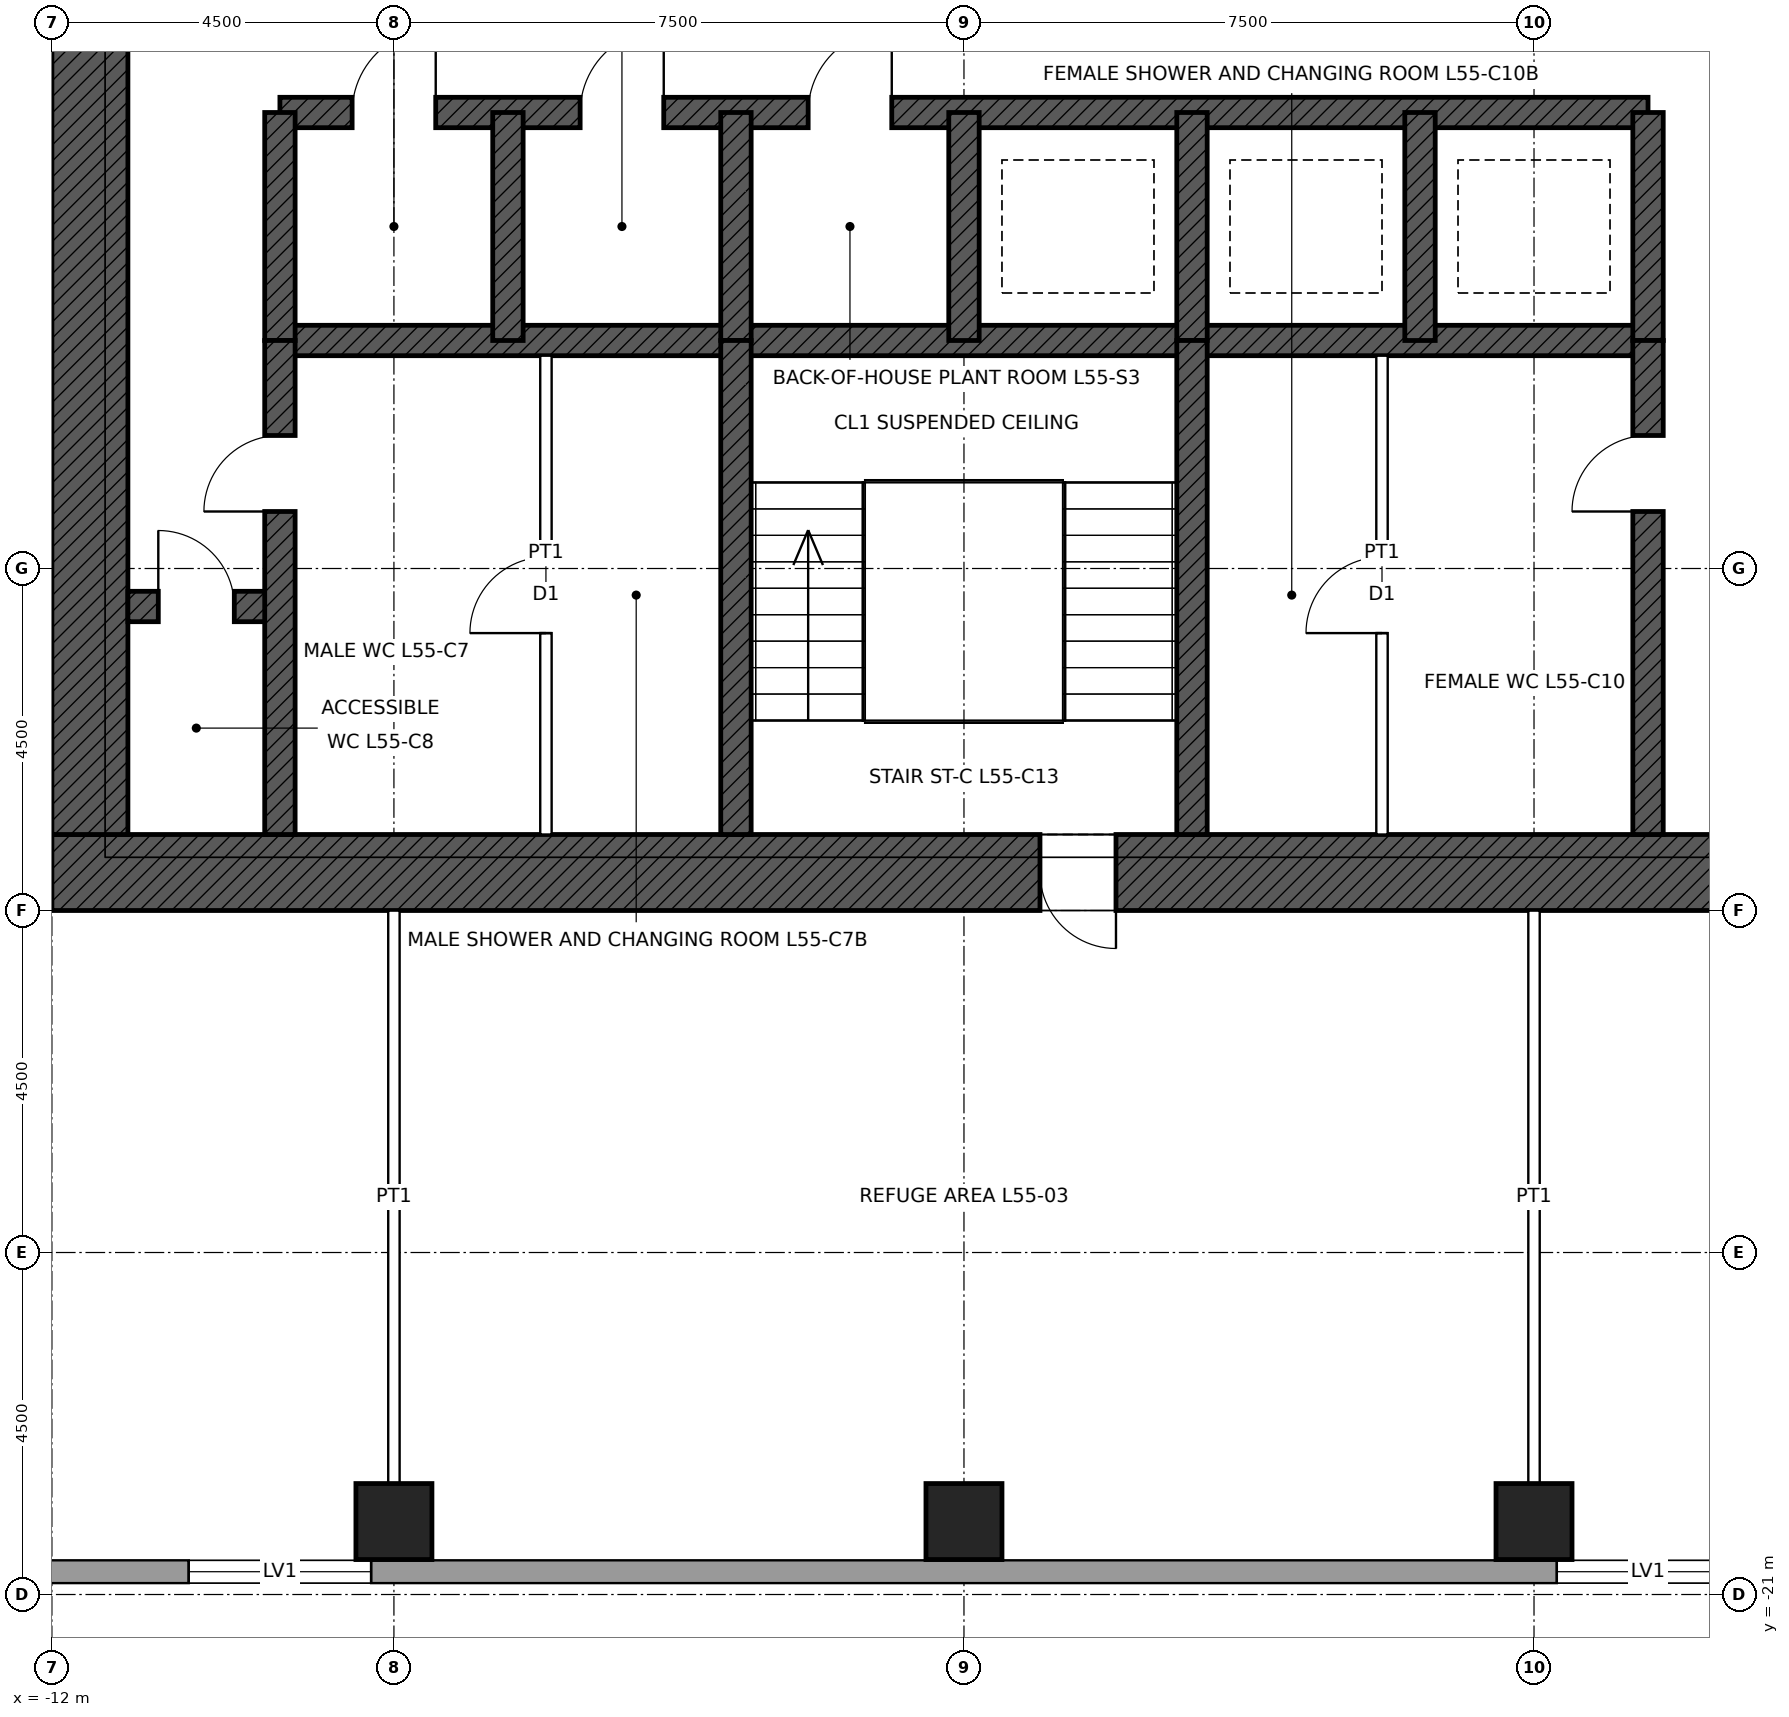
"""IFC4 building model, lengths in metres.
Left out: names, types, materials, properties, quantities, classifications, styles, units other than length and angle.
Written with IfcOpenShell. Run it as: python <this file> out.ifc"""

import sys

from ifc_helpers import new_model, si_unit, direction, frame, frame_2d, origin, origin_2d, place, context, subcontext, project, spatial, rectangle, hollow_rectangle, extrude, element, fill, save


model = new_model("IFC4")
c1 = context("Model", 3, precision=1e-05, world=origin(), true_north=direction((0.0, 1.0)))
c2 = subcontext(c1, "Body", "Model", "MODEL_VIEW")
j1 = project(units=[si_unit("LENGTHUNIT", "METRE"), si_unit("PLANEANGLEUNIT", "RADIAN")], contexts=[c1])
p1 = place(None, origin())
s1 = spatial("IfcSite", under=j1, at=p1, CompositionType="ELEMENT")
p2 = place(p1, origin())
s2 = spatial("IfcBuilding", under=s1, at=p2, CompositionType="ELEMENT")
p3 = place(p2, frame((0.0, 0.0, 253.9)))
s3 = spatial("IfcBuildingStorey", under=s2, at=p3, CompositionType="ELEMENT", Elevation=253.9)
p4 = place(p3, frame((12.0, -11.5, 0.0), z_axis=(0.0, 0.0, 1.0), x_axis=(-1.0, 0.0, 0.0)))
e1 = element("IfcWall", 1, at=p4, inside=s3, PredefinedType="SHEAR", context=c2, shape_type="SweptSolid", body=[
    extrude(rectangle(XDim=24.0, YDim=1.0, at=frame_2d((12.0, 0.0))), origin(), (0.0, 0.0, 1.0), 6.0),
])
p5 = place(p4, frame((10.0, 0.0, 0.0)))
e2 = element("IfcOpeningElement", 2, at=p5, cuts=e1, PredefinedType="OPENING", context=c2, shape_type="SweptSolid", body=[
    extrude(rectangle(XDim=1.0, YDim=2.1, at=frame_2d((0.5, 1.05))), frame((0.0, 0.51, 0.0), z_axis=(0.0, -1.0, 0.0), x_axis=(1.0, 0.0, 0.0)), (0.0, 0.0, 1.0), 1.02),
])
p6 = place(p4, frame((1.0, 0.0, 0.0)))
e3 = element("IfcOpeningElement", 3, at=p6, cuts=e1, PredefinedType="OPENING", context=c2, shape_type="SweptSolid", body=[
    extrude(rectangle(XDim=1.0, YDim=2.4, at=frame_2d((0.5, 1.2))), frame((0.0, 0.51, 0.0), z_axis=(0.0, -1.0, 0.0), x_axis=(1.0, 0.0, 0.0)), (0.0, 0.0, 1.0), 1.02),
])
p7 = place(p3, frame((-11.5, -11.0, 0.0), z_axis=(0.0, 0.0, 1.0), x_axis=(0.0, 1.0, 0.0)))
e4 = element("IfcWall", 4, at=p7, inside=s3, PredefinedType="SHEAR", context=c2, shape_type="SweptSolid", body=[
    extrude(rectangle(XDim=22.0, YDim=1.0, at=frame_2d((11.0, 0.0))), origin(), (0.0, 0.0, 1.0), 6.0),
])
p8 = place(p7, frame((12.0, 0.0, 0.0)))
e5 = element("IfcOpeningElement", 5, at=p8, cuts=e4, PredefinedType="OPENING", context=c2, shape_type="SweptSolid", body=[
    extrude(rectangle(XDim=1.0, YDim=2.4, at=frame_2d((0.5, 1.2))), frame((0.0, 0.51, 0.0), z_axis=(0.0, -1.0, 0.0), x_axis=(1.0, 0.0, 0.0)), (0.0, 0.0, 1.0), 1.02),
])
p9 = place(p3, frame((-9.0, -1.5, 0.0), z_axis=(0.0, 0.0, 1.0), x_axis=(1.0, 0.0, 0.0)))
e6 = element("IfcWall", 6, at=p9, inside=s3, PredefinedType="SHEAR", context=c2, shape_type="SweptSolid", body=[
    extrude(rectangle(XDim=18.0, YDim=0.4, at=frame_2d((9.0, 0.0))), origin(), (0.0, 0.0, 1.0), 6.0),
])
p10 = place(p9, frame((0.95, 0.0, 0.0)))
e7 = element("IfcOpeningElement", 7, at=p10, cuts=e6, PredefinedType="OPENING", context=c2, shape_type="SweptSolid", body=[
    extrude(rectangle(XDim=1.1, YDim=2.1, at=frame_2d((0.55, 1.05))), frame((0.0, 0.21, 0.0), z_axis=(0.0, -1.0, 0.0), x_axis=(1.0, 0.0, 0.0)), (0.0, 0.0, 1.0), 0.42),
])
p11 = place(p9, frame((3.95, 0.0, 0.0)))
e8 = element("IfcOpeningElement", 8, at=p11, cuts=e6, PredefinedType="OPENING", context=c2, shape_type="SweptSolid", body=[
    extrude(rectangle(XDim=1.1, YDim=2.1, at=frame_2d((0.55, 1.05))), frame((0.0, 0.21, 0.0), z_axis=(0.0, -1.0, 0.0), x_axis=(1.0, 0.0, 0.0)), (0.0, 0.0, 1.0), 0.42),
])
p12 = place(p9, frame((6.95, 0.0, 0.0)))
e9 = element("IfcOpeningElement", 9, at=p12, cuts=e6, PredefinedType="OPENING", context=c2, shape_type="SweptSolid", body=[
    extrude(rectangle(XDim=1.1, YDim=2.1, at=frame_2d((0.55, 1.05))), frame((0.0, 0.21, 0.0), z_axis=(0.0, -1.0, 0.0), x_axis=(1.0, 0.0, 0.0)), (0.0, 0.0, 1.0), 0.42),
])
p13 = place(p3, frame((-9.0, -4.5, 0.0), z_axis=(0.0, 0.0, 1.0), x_axis=(1.0, 0.0, 0.0)))
e10 = element("IfcWall", 10, at=p13, inside=s3, PredefinedType="SHEAR", context=c2, shape_type="SweptSolid", body=[
    extrude(rectangle(XDim=18.0, YDim=0.4, at=frame_2d((9.0, 0.0))), origin(), (0.0, 0.0, 1.0), 6.0),
])
p14 = place(p3, frame((-11.0, -8.0, 0.0), z_axis=(0.0, 0.0, 1.0), x_axis=(1.0, 0.0, 0.0)))
e11 = element("IfcWall", 11, at=p14, inside=s3, PredefinedType="SHEAR", context=c2, shape_type="SweptSolid", body=[
    extrude(rectangle(XDim=2.0, YDim=0.4, at=frame_2d((1.0, 0.0))), origin(), (0.0, 0.0, 1.0), 6.0),
])
p15 = place(p14, frame((0.4, 0.0, 0.0)))
e12 = element("IfcOpeningElement", 12, at=p15, cuts=e11, PredefinedType="OPENING", context=c2, shape_type="SweptSolid", body=[
    extrude(rectangle(XDim=1.0, YDim=2.1, at=frame_2d((0.5, 1.05))), frame((0.0, 0.21, 0.0), z_axis=(0.0, -1.0, 0.0), x_axis=(1.0, 0.0, 0.0)), (0.0, 0.0, 1.0), 0.42),
])
for number, where, z_axis, x_axis in (
    (13, (-9.0, -4.5, 0.0), (0.0, 0.0, 1.0), (0.0, 1.0, 0.0)),
    (14, (9.0, -4.5, 0.0), (0.0, 0.0, 1.0), (0.0, 1.0, 0.0)),
    (15, (-6.0, -4.5, 0.0), (0.0, 0.0, 1.0), (0.0, 1.0, 0.0)),
    (16, (-3.0, -4.5, 0.0), (0.0, 0.0, 1.0), (0.0, 1.0, 0.0)),
    (17, (0.0, -4.5, 0.0), (0.0, 0.0, 1.0), (0.0, 1.0, 0.0)),
    (18, (3.0, -4.5, 0.0), (0.0, 0.0, 1.0), (0.0, 1.0, 0.0)),
    (19, (6.0, -4.5, 0.0), (0.0, 0.0, 1.0), (0.0, 1.0, 0.0)),
):
    element("IfcWall", number, at=place(p3, frame(where, z_axis=z_axis, x_axis=x_axis)), inside=s3, PredefinedType="SHEAR", context=c2, shape_type="SweptSolid", body=[
        extrude(rectangle(XDim=3.0, YDim=0.4, at=frame_2d((1.5, 0.0))), origin(), (0.0, 0.0, 1.0), 6.0),
    ])
p16 = place(p3, frame((-9.0, -11.0, 0.0), z_axis=(0.0, 0.0, 1.0), x_axis=(0.0, 1.0, 0.0)))
e20 = element("IfcWall", 20, at=p16, inside=s3, PredefinedType="SHEAR", context=c2, shape_type="SweptSolid", body=[
    extrude(rectangle(XDim=6.5, YDim=0.4, at=frame_2d((3.25, 0.0))), origin(), (0.0, 0.0, 1.0), 6.0),
])
p17 = place(p16, frame((4.25, 0.0, 0.0)))
e21 = element("IfcOpeningElement", 21, at=p17, cuts=e20, PredefinedType="OPENING", context=c2, shape_type="SweptSolid", body=[
    extrude(rectangle(XDim=1.0, YDim=2.1, at=frame_2d((0.5, 1.05))), frame((0.0, 0.21, 0.0), z_axis=(0.0, -1.0, 0.0), x_axis=(1.0, 0.0, 0.0)), (0.0, 0.0, 1.0), 0.42),
])
p18 = place(p3, frame((9.0, -11.0, 0.0), z_axis=(0.0, 0.0, 1.0), x_axis=(0.0, 1.0, 0.0)))
e22 = element("IfcWall", 22, at=p18, inside=s3, PredefinedType="SHEAR", context=c2, shape_type="SweptSolid", body=[
    extrude(rectangle(XDim=6.5, YDim=0.4, at=frame_2d((3.25, 0.0))), origin(), (0.0, 0.0, 1.0), 6.0),
])
p19 = place(p18, frame((4.25, 0.0, 0.0)))
e23 = element("IfcOpeningElement", 23, at=p19, cuts=e22, PredefinedType="OPENING", context=c2, shape_type="SweptSolid", body=[
    extrude(rectangle(XDim=1.0, YDim=2.1, at=frame_2d((0.5, 1.05))), frame((0.0, 0.21, 0.0), z_axis=(0.0, -1.0, 0.0), x_axis=(1.0, 0.0, 0.0)), (0.0, 0.0, 1.0), 0.42),
])
for number, where, z_axis, x_axis in (
    (24, (-3.0, -11.0, 0.0), (0.0, 0.0, 1.0), (0.0, 1.0, 0.0)),
    (25, (3.0, -11.0, 0.0), (0.0, 0.0, 1.0), (0.0, 1.0, 0.0)),
):
    element("IfcWall", number, at=place(p3, frame(where, z_axis=z_axis, x_axis=x_axis)), inside=s3, PredefinedType="SHEAR", context=c2, shape_type="SweptSolid", body=[
        extrude(rectangle(XDim=6.5, YDim=0.4, at=frame_2d((3.25, 0.0))), origin(), (0.0, 0.0, 1.0), 6.0),
    ])
for number, where, z_axis, x_axis in (
    (26, (7.5, -20.04, -0.25), (0.0, 0.0, 1.0), (1.0, 0.0, 0.0)),
    (27, (0.0, -20.04, -0.25), (0.0, 0.0, 1.0), (1.0, 0.0, 0.0)),
    (28, (-7.5, -20.04, -0.25), (0.0, 0.0, 1.0), (1.0, 0.0, 0.0)),
):
    element("IfcColumn", number, at=place(p3, frame(where, z_axis=z_axis, x_axis=x_axis)), inside=s3, PredefinedType="COLUMN", context=c2, shape_type="SweptSolid", body=[
        extrude(hollow_rectangle(XDim=1.0, YDim=1.0, WallThickness=0.075, at=origin_2d()), origin(), (0.0, 0.0, 1.0), 6.25),
    ])
p20 = place(p3, frame((13.2, -20.7, 0.0), z_axis=(0.0, 0.0, 1.0), x_axis=(-1.0, 0.0, 0.0)))
e29 = element("IfcWall", 29, at=p20, inside=s3, PredefinedType="SOLIDWALL", context=c2, shape_type="SweptSolid", body=[
    extrude(rectangle(XDim=26.4, YDim=0.3, at=frame_2d((13.2, 0.0))), origin(), (0.0, 0.0, 1.0), 5.85),
])
p21 = place(p20, frame((0.5, 0.0, 2.1)))
e30 = element("IfcOpeningElement", 30, at=p21, cuts=e29, PredefinedType="OPENING", context=c2, shape_type="SweptSolid", body=[
    extrude(rectangle(XDim=2.4, YDim=2.4, at=frame_2d((1.2, 1.2))), frame((0.0, 0.16, 0.0), z_axis=(0.0, -1.0, 0.0), x_axis=(1.0, 0.0, 0.0)), (0.0, 0.0, 1.0), 0.32),
])
p22 = place(p20, frame((3.0, 0.0, 2.1)))
e31 = element("IfcOpeningElement", 31, at=p22, cuts=e29, PredefinedType="OPENING", context=c2, shape_type="SweptSolid", body=[
    extrude(rectangle(XDim=2.4, YDim=2.4, at=frame_2d((1.2, 1.2))), frame((0.0, 0.16, 0.0), z_axis=(0.0, -1.0, 0.0), x_axis=(1.0, 0.0, 0.0)), (0.0, 0.0, 1.0), 0.32),
])
p23 = place(p20, frame((21.0, 0.0, 2.1)))
e32 = element("IfcOpeningElement", 32, at=p23, cuts=e29, PredefinedType="OPENING", context=c2, shape_type="SweptSolid", body=[
    extrude(rectangle(XDim=2.4, YDim=2.4, at=frame_2d((1.2, 1.2))), frame((0.0, 0.16, 0.0), z_axis=(0.0, -1.0, 0.0), x_axis=(1.0, 0.0, 0.0)), (0.0, 0.0, 1.0), 0.32),
])
for number, where, z_axis, x_axis in (
    (33, (-7.5, -12.0, 0.0), (0.0, 0.0, 1.0), (0.0, -1.0, 0.0)),
    (34, (7.5, -12.0, 0.0), (0.0, 0.0, 1.0), (0.0, -1.0, 0.0)),
):
    element("IfcWall", number, at=place(p3, frame(where, z_axis=z_axis, x_axis=x_axis)), inside=s3, PredefinedType="PARTITIONING", context=c2, shape_type="SweptSolid", body=[
        extrude(rectangle(XDim=7.54, YDim=0.15, at=frame_2d((3.77, 0.0))), origin(), (0.0, 0.0, 1.0), 5.85),
    ])
p24 = place(p3, frame((-5.5, -11.0, 0.0), z_axis=(0.0, 0.0, 1.0), x_axis=(0.0, 1.0, 0.0)))
e35 = element("IfcWall", 35, at=p24, inside=s3, PredefinedType="PARTITIONING", context=c2, shape_type="SweptSolid", body=[
    extrude(rectangle(XDim=6.3, YDim=0.15, at=frame_2d((3.15, 0.0))), origin(), (0.0, 0.0, 1.0), 5.75),
])
p25 = place(p24, frame((2.65, 0.0, 0.0)))
e36 = element("IfcOpeningElement", 36, at=p25, cuts=e35, PredefinedType="OPENING", context=c2, shape_type="SweptSolid", body=[
    extrude(rectangle(XDim=1.0, YDim=2.1, at=frame_2d((0.5, 1.05))), frame((0.0, 0.085, 0.0), z_axis=(0.0, -1.0, 0.0), x_axis=(1.0, 0.0, 0.0)), (0.0, 0.0, 1.0), 0.17),
])
p26 = place(p3, frame((5.5, -11.0, 0.0), z_axis=(0.0, 0.0, 1.0), x_axis=(0.0, 1.0, 0.0)))
e37 = element("IfcWall", 37, at=p26, inside=s3, PredefinedType="PARTITIONING", context=c2, shape_type="SweptSolid", body=[
    extrude(rectangle(XDim=6.3, YDim=0.15, at=frame_2d((3.15, 0.0))), origin(), (0.0, 0.0, 1.0), 5.75),
])
p27 = place(p26, frame((2.65, 0.0, 0.0)))
e38 = element("IfcOpeningElement", 38, at=p27, cuts=e37, PredefinedType="OPENING", context=c2, shape_type="SweptSolid", body=[
    extrude(rectangle(XDim=1.0, YDim=2.1, at=frame_2d((0.5, 1.05))), frame((0.0, 0.085, 0.0), z_axis=(0.0, -1.0, 0.0), x_axis=(1.0, 0.0, 0.0)), (0.0, 0.0, 1.0), 0.17),
])
p28 = place(p22, origin())
e39 = element("IfcWindow", 39, at=p28, inside=s3, PartitioningType="SINGLE_PANEL", PredefinedType="WINDOW", context=c2, shape_type="SweptSolid", body=[
    extrude(rectangle(XDim=2.4, YDim=2.4, at=frame_2d((1.2, 1.2))), frame((0.0, 0.15, 0.0), z_axis=(0.0, -1.0, 0.0), x_axis=(1.0, 0.0, 0.0)), (0.0, 0.0, 1.0), 0.06),
])
fill(e31, e39)
p29 = place(p23, origin())
e40 = element("IfcWindow", 40, at=p29, inside=s3, PartitioningType="SINGLE_PANEL", PredefinedType="WINDOW", context=c2, shape_type="SweptSolid", body=[
    extrude(rectangle(XDim=2.4, YDim=2.4, at=frame_2d((1.2, 1.2))), frame((0.0, 0.15, 0.0), z_axis=(0.0, -1.0, 0.0), x_axis=(1.0, 0.0, 0.0)), (0.0, 0.0, 1.0), 0.06),
])
fill(e32, e40)
p30 = place(p5, origin())
e41 = element("IfcDoor", 41, at=p30, inside=s3, OperationType="SINGLE_SWING_LEFT", PredefinedType="DOOR", context=c2, shape_type="SweptSolid", body=[
    extrude(rectangle(XDim=1.0, YDim=2.1, at=frame_2d((0.5, 1.05))), frame((0.0, 0.485, 0.0), z_axis=(0.0, -1.0, 0.0), x_axis=(1.0, 0.0, 0.0)), (0.0, 0.0, 1.0), 0.05),
])
fill(e2, e41)
p31 = place(p17, origin())
e42 = element("IfcDoor", 42, at=p31, inside=s3, OperationType="SINGLE_SWING_LEFT", PredefinedType="DOOR", context=c2, shape_type="SweptSolid", body=[
    extrude(rectangle(XDim=1.0, YDim=2.1, at=frame_2d((0.5, 1.05))), frame((0.0, 0.025, 0.0), z_axis=(0.0, -1.0, 0.0), x_axis=(1.0, 0.0, 0.0)), (0.0, 0.0, 1.0), 0.05),
])
fill(e21, e42)
p32 = place(p19, origin())
e43 = element("IfcDoor", 43, at=p32, inside=s3, OperationType="SINGLE_SWING_LEFT", PredefinedType="DOOR", context=c2, shape_type="SweptSolid", body=[
    extrude(rectangle(XDim=1.0, YDim=2.1, at=frame_2d((0.5, 1.05))), frame((0.0, 0.025, 0.0), z_axis=(0.0, -1.0, 0.0), x_axis=(1.0, 0.0, 0.0)), (0.0, 0.0, 1.0), 0.05),
])
fill(e23, e43)
p33 = place(p15, origin())
e44 = element("IfcDoor", 44, at=p33, inside=s3, OperationType="SINGLE_SWING_LEFT", PredefinedType="DOOR", context=c2, shape_type="SweptSolid", body=[
    extrude(rectangle(XDim=1.0, YDim=2.1, at=frame_2d((0.5, 1.05))), frame((0.0, 0.025, 0.0), z_axis=(0.0, -1.0, 0.0), x_axis=(1.0, 0.0, 0.0)), (0.0, 0.0, 1.0), 0.05),
])
fill(e12, e44)
p34 = place(p25, origin())
e45 = element("IfcDoor", 45, at=p34, inside=s3, OperationType="SINGLE_SWING_LEFT", PredefinedType="DOOR", context=c2, shape_type="SweptSolid", body=[
    extrude(rectangle(XDim=1.0, YDim=2.1, at=frame_2d((0.5, 1.05))), frame((0.0, 0.025, 0.0), z_axis=(0.0, -1.0, 0.0), x_axis=(1.0, 0.0, 0.0)), (0.0, 0.0, 1.0), 0.05),
])
fill(e36, e45)
p35 = place(p27, origin())
e46 = element("IfcDoor", 46, at=p35, inside=s3, OperationType="SINGLE_SWING_LEFT", PredefinedType="DOOR", context=c2, shape_type="SweptSolid", body=[
    extrude(rectangle(XDim=1.0, YDim=2.1, at=frame_2d((0.5, 1.05))), frame((0.0, 0.025, 0.0), z_axis=(0.0, -1.0, 0.0), x_axis=(1.0, 0.0, 0.0)), (0.0, 0.0, 1.0), 0.05),
])
fill(e38, e46)
p36 = place(p10, origin())
e47 = element("IfcDoor", 47, at=p36, inside=s3, OperationType="SINGLE_SWING_RIGHT", PredefinedType="DOOR", context=c2, shape_type="SweptSolid", body=[
    extrude(rectangle(XDim=1.1, YDim=2.1, at=frame_2d((0.55, 1.05))), frame((0.0, 0.025, 0.0), z_axis=(0.0, -1.0, 0.0), x_axis=(1.0, 0.0, 0.0)), (0.0, 0.0, 1.0), 0.05),
])
fill(e7, e47)
p37 = place(p11, origin())
e48 = element("IfcDoor", 48, at=p37, inside=s3, OperationType="SINGLE_SWING_RIGHT", PredefinedType="DOOR", context=c2, shape_type="SweptSolid", body=[
    extrude(rectangle(XDim=1.1, YDim=2.1, at=frame_2d((0.55, 1.05))), frame((0.0, 0.025, 0.0), z_axis=(0.0, -1.0, 0.0), x_axis=(1.0, 0.0, 0.0)), (0.0, 0.0, 1.0), 0.05),
])
fill(e8, e48)
p38 = place(p12, origin())
e49 = element("IfcDoor", 49, at=p38, inside=s3, OperationType="SINGLE_SWING_RIGHT", PredefinedType="DOOR", context=c2, shape_type="SweptSolid", body=[
    extrude(rectangle(XDim=1.1, YDim=2.1, at=frame_2d((0.55, 1.05))), frame((0.0, 0.025, 0.0), z_axis=(0.0, -1.0, 0.0), x_axis=(1.0, 0.0, 0.0)), (0.0, 0.0, 1.0), 0.05),
])
fill(e9, e49)
save(model, sys.argv[1])
